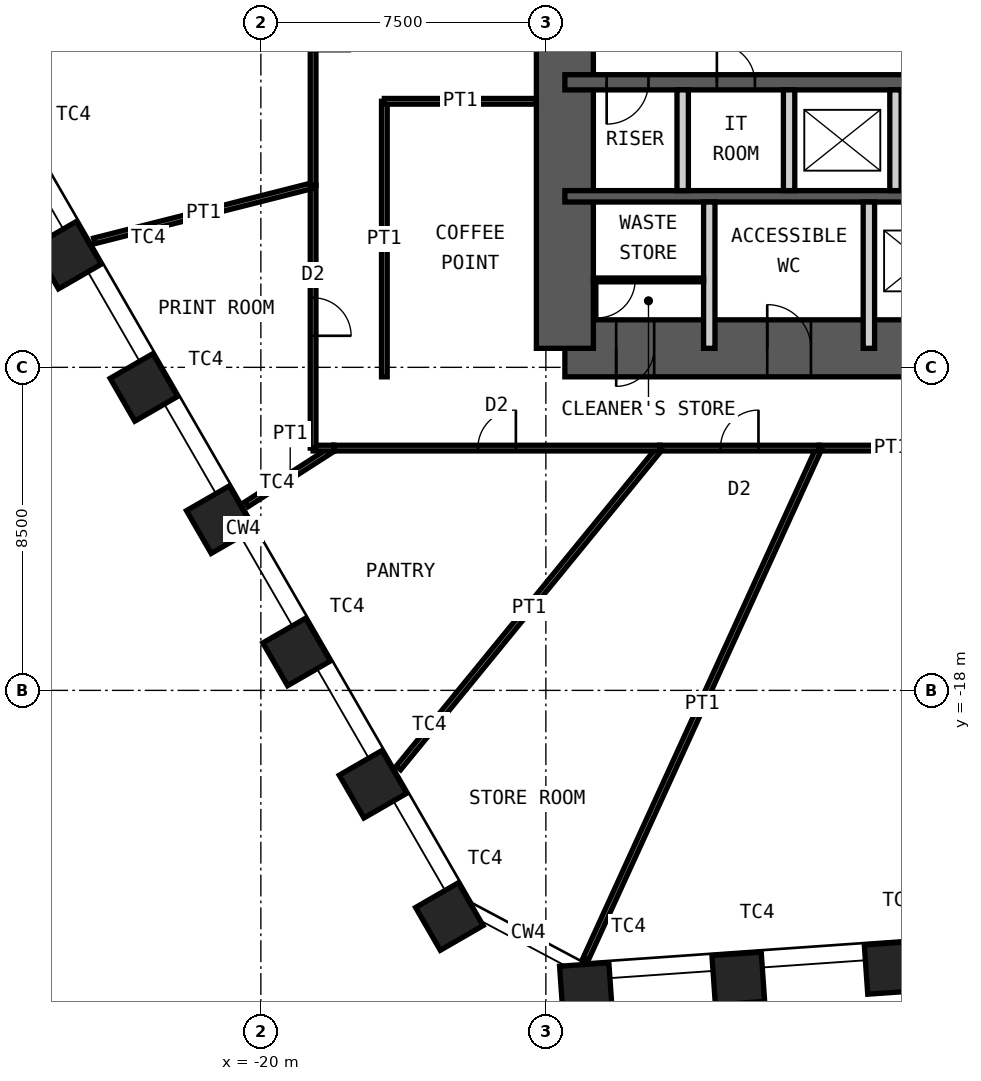
"""IFC4 building model, lengths in metres.
Left out: names, types, materials, properties, quantities, classifications, styles, units other than length and angle.
Written with IfcOpenShell. Run it as: python <this file> out.ifc"""

import sys

from ifc_helpers import new_model, si_unit, direction, frame, frame_2d, origin, origin_2d, place, context, subcontext, project, spatial, rectangle, hollow_rectangle, extrude, element, fill, save


model = new_model("IFC4")
c1 = context("Model", 3, precision=1e-05, world=origin(), true_north=direction((0.0, 1.0)))
c2 = subcontext(c1, "Body", "Model", "MODEL_VIEW")
j1 = project(units=[si_unit("LENGTHUNIT", "METRE"), si_unit("PLANEANGLEUNIT", "RADIAN")], contexts=[c1])
p1 = place(None, origin())
s1 = spatial("IfcSite", under=j1, at=p1, CompositionType="ELEMENT")
p2 = place(p1, origin())
s2 = spatial("IfcBuilding", under=s1, at=p2, CompositionType="ELEMENT")
p3 = place(p2, frame((0.0, 0.0, 149.2)))
s3 = spatial("IfcBuildingStorey", under=s2, at=p3, CompositionType="ELEMENT", Elevation=149.2)
for number, where, z_axis, x_axis in (
    (1, (-3.427, -25.301, 0.0), (0.0, 0.0, 1.0), (0.998, 0.07, 0.0)),
    (2, (-7.436, -25.581, 0.0), (0.0, 0.0, 1.0), (0.998, 0.07, 0.0)),
    (3, (-11.446, -25.861, 0.0), (0.0, 0.0, 1.0), (0.998, 0.07, 0.0)),
    (4, (-15.04, -23.95, 0.0), (0.0, 0.0, 1.0), (0.5, -0.866, 0.0)),
    (5, (-17.049, -20.47, 0.0), (0.0, 0.0, 1.0), (0.5, -0.866, 0.0)),
    (6, (-19.059, -16.989, 0.0), (0.0, 0.0, 1.0), (0.5, -0.866, 0.0)),
    (7, (-21.068, -13.509, 0.0), (0.0, 0.0, 1.0), (0.5, -0.866, 0.0)),
    (8, (-23.078, -10.028, 0.0), (0.0, 0.0, 1.0), (0.5, -0.866, 0.0)),
    (9, (-25.087, -6.547, 0.0), (0.0, 0.0, 1.0), (0.5, -0.866, 0.0)),
):
    element("IfcColumn", number, at=place(p3, frame(where, z_axis=z_axis, x_axis=x_axis)), inside=s3, PredefinedType="COLUMN", context=c2, shape_type="SweptSolid", body=[
        extrude(hollow_rectangle(XDim=1.3, YDim=1.3, WallThickness=0.1, at=origin_2d()), origin(), (0.0, 0.0, 1.0), 4.2),
    ])
p4 = place(p3, frame((-12.0, -9.0, 0.0), z_axis=(0.0, 0.0, 1.0), x_axis=(1.0, 0.0, 0.0)))
e10 = element("IfcWall", 10, at=p4, inside=s3, PredefinedType="SHEAR", context=c2, shape_type="SweptSolid", body=[
    extrude(rectangle(XDim=24.0, YDim=1.5, at=frame_2d((12.0, 0.0))), origin(), (0.0, 0.0, 1.0), 4.2),
])
p5 = place(p4, frame((1.35, 0.0, 0.0)))
e11 = element("IfcOpeningElement", 11, at=p5, cuts=e10, PredefinedType="OPENING", context=c2, shape_type="SweptSolid", body=[
    extrude(rectangle(XDim=1.0, YDim=2.1, at=frame_2d((0.5, 1.05))), frame((0.0, 0.76, 0.0), z_axis=(0.0, -1.0, 0.0), x_axis=(1.0, 0.0, 0.0)), (0.0, 0.0, 1.0), 1.52),
])
p6 = place(p4, frame((5.325, 0.0, 0.0)))
e12 = element("IfcOpeningElement", 12, at=p6, cuts=e10, PredefinedType="OPENING", context=c2, shape_type="SweptSolid", body=[
    extrude(rectangle(XDim=1.15, YDim=2.1, at=frame_2d((0.575, 1.05))), frame((0.0, 0.76, 0.0), z_axis=(0.0, -1.0, 0.0), x_axis=(1.0, 0.0, 0.0)), (0.0, 0.0, 1.0), 1.52),
])
p7 = place(p4, frame((12.6, 0.0, 0.0)))
e13 = element("IfcOpeningElement", 13, at=p7, cuts=e10, PredefinedType="OPENING", context=c2, shape_type="SweptSolid", body=[
    extrude(rectangle(XDim=1.0, YDim=2.1, at=frame_2d((0.5, 1.05))), frame((0.0, 0.76, 0.0), z_axis=(0.0, -1.0, 0.0), x_axis=(1.0, 0.0, 0.0)), (0.0, 0.0, 1.0), 1.52),
])
p8 = place(p3, frame((-12.0, -9.0, 0.0), z_axis=(0.0, 0.0, 1.0), x_axis=(0.0, 1.0, 0.0)))
e14 = element("IfcWall", 14, at=p8, inside=s3, PredefinedType="SHEAR", context=c2, shape_type="SweptSolid", body=[
    extrude(rectangle(XDim=18.0, YDim=1.5, at=frame_2d((9.0, 0.0))), origin(), (0.0, 0.0, 1.0), 4.2),
])
p9 = place(p8, frame((8.1, 0.0, 0.0)))
e15 = element("IfcOpeningElement", 15, at=p9, cuts=e14, PredefinedType="OPENING", context=c2, shape_type="SweptSolid", body=[
    extrude(rectangle(XDim=1.8, YDim=2.1, at=frame_2d((0.9, 1.05))), frame((0.0, 0.76, 0.0), z_axis=(0.0, -1.0, 0.0), x_axis=(1.0, 0.0, 0.0)), (0.0, 0.0, 1.0), 1.52),
])
p10 = place(p3, frame((-12.0, -2.0, 0.0), z_axis=(0.0, 0.0, 1.0), x_axis=(1.0, 0.0, 0.0)))
e16 = element("IfcWall", 16, at=p10, inside=s3, PredefinedType="SHEAR", context=c2, shape_type="SweptSolid", body=[
    extrude(rectangle(XDim=24.0, YDim=0.4, at=frame_2d((12.0, 0.0))), origin(), (0.0, 0.0, 1.0), 4.2),
])
p11 = place(p10, frame((1.1, 0.0, 0.0)))
e17 = element("IfcOpeningElement", 17, at=p11, cuts=e16, PredefinedType="OPENING", context=c2, shape_type="SweptSolid", body=[
    extrude(rectangle(XDim=1.1, YDim=2.1, at=frame_2d((0.55, 1.05))), frame((0.0, 0.21, 0.0), z_axis=(0.0, -1.0, 0.0), x_axis=(1.0, 0.0, 0.0)), (0.0, 0.0, 1.0), 0.42),
])
p12 = place(p10, frame((13.55, 0.0, 0.0)))
e18 = element("IfcOpeningElement", 18, at=p12, cuts=e16, PredefinedType="OPENING", context=c2, shape_type="SweptSolid", body=[
    extrude(rectangle(XDim=1.1, YDim=2.1, at=frame_2d((0.55, 1.05))), frame((0.0, 0.21, 0.0), z_axis=(0.0, -1.0, 0.0), x_axis=(1.0, 0.0, 0.0)), (0.0, 0.0, 1.0), 0.42),
])
p13 = place(p10, frame((20.7, 0.0, 0.0)))
e19 = element("IfcOpeningElement", 19, at=p13, cuts=e16, PredefinedType="OPENING", context=c2, shape_type="SweptSolid", body=[
    extrude(rectangle(XDim=1.1, YDim=2.1, at=frame_2d((0.55, 1.05))), frame((0.0, 0.21, 0.0), z_axis=(0.0, -1.0, 0.0), x_axis=(1.0, 0.0, 0.0)), (0.0, 0.0, 1.0), 0.42),
])
p14 = place(p10, frame((4.0, 0.0, 0.0)))
e20 = element("IfcOpeningElement", 20, at=p14, cuts=e16, PredefinedType="OPENING", context=c2, shape_type="SweptSolid", body=[
    extrude(rectangle(XDim=1.0, YDim=2.1, at=frame_2d((0.5, 1.05))), frame((0.0, 0.21, 0.0), z_axis=(0.0, -1.0, 0.0), x_axis=(1.0, 0.0, 0.0)), (0.0, 0.0, 1.0), 0.42),
])
p15 = place(p3, frame((-12.0, -5.0, 0.0), z_axis=(0.0, 0.0, 1.0), x_axis=(1.0, 0.0, 0.0)))
e21 = element("IfcWall", 21, at=p15, inside=s3, PredefinedType="SHEAR", context=c2, shape_type="SweptSolid", body=[
    extrude(rectangle(XDim=24.0, YDim=0.3, at=frame_2d((12.0, 0.0))), origin(), (0.0, 0.0, 1.0), 4.2),
])
for number, where, z_axis, x_axis in (
    (22, (-8.9, -4.85, 0.0), (0.0, 0.0, 1.0), (0.0, 1.0, 0.0)),
    (23, (-6.1, -4.85, 0.0), (0.0, 0.0, 1.0), (0.0, 1.0, 0.0)),
    (24, (-3.3, -4.85, 0.0), (0.0, 0.0, 1.0), (0.0, 1.0, 0.0)),
):
    element("IfcWall", number, at=place(p3, frame(where, z_axis=z_axis, x_axis=x_axis)), inside=s3, PredefinedType="PARTITIONING", context=c2, shape_type="SweptSolid", body=[
        extrude(rectangle(XDim=2.65, YDim=0.3, at=frame_2d((1.325, 0.0))), origin(), (0.0, 0.0, 1.0), 3.98),
    ])
for number, where, z_axis, x_axis in (
    (25, (-8.2, -9.0, 0.0), (0.0, 0.0, 1.0), (0.0, 1.0, 0.0)),
    (26, (-4.0, -9.0, 0.0), (0.0, 0.0, 1.0), (0.0, 1.0, 0.0)),
):
    element("IfcWall", number, at=place(p3, frame(where, z_axis=z_axis, x_axis=x_axis)), inside=s3, PredefinedType="PARTITIONING", context=c2, shape_type="SweptSolid", body=[
        extrude(rectangle(XDim=3.85, YDim=0.3, at=frame_2d((1.925, 0.0))), origin(), (0.0, 0.0, 1.0), 3.98),
    ])
p16 = place(p3, frame((-11.25, -7.2, 0.0), z_axis=(0.0, 0.0, 1.0), x_axis=(1.0, 0.0, 0.0)))
e27 = element("IfcWall", 27, at=p16, inside=s3, PredefinedType="PARTITIONING", context=c2, shape_type="SweptSolid", body=[
    extrude(rectangle(XDim=2.9, YDim=0.1, at=frame_2d((1.45, 0.0))), origin(), (0.0, 0.0, 1.0), 3.98),
])
p17 = place(p16, frame((0.1, 0.0, 0.0)))
e28 = element("IfcOpeningElement", 28, at=p17, cuts=e27, PredefinedType="OPENING", context=c2, shape_type="SweptSolid", body=[
    extrude(rectangle(XDim=1.0, YDim=2.4, at=frame_2d((0.5, 1.2))), frame((0.0, 0.06, 0.0), z_axis=(0.0, -1.0, 0.0), x_axis=(1.0, 0.0, 0.0)), (0.0, 0.0, 1.0), 0.12),
])
p18 = place(p3, frame((4.184, -11.625, 0.0), z_axis=(0.0, 0.0, 1.0), x_axis=(-1.0, 0.0, 0.0)))
e29 = element("IfcWall", 29, at=p18, inside=s3, PredefinedType="PARTITIONING", context=c2, shape_type="SweptSolid", body=[
    extrude(rectangle(XDim=9.494, YDim=0.15, at=frame_2d((4.747, 0.0))), origin(), (0.0, 0.0, 1.0), 4.03),
])
p19 = place(p18, frame((3.847, 0.0, 0.0)))
e30 = element("IfcOpeningElement", 30, at=p19, cuts=e29, PredefinedType="OPENING", context=c2, shape_type="SweptSolid", body=[
    extrude(rectangle(XDim=1.8, YDim=2.4, at=frame_2d((0.9, 1.2))), frame((0.0, 0.085, 0.0), z_axis=(0.0, -1.0, 0.0), x_axis=(1.0, 0.0, 0.0)), (0.0, 0.0, 1.0), 0.17),
])
p20 = place(p3, frame((-11.453, -25.072, 0.0), z_axis=(0.0, 0.0, 1.0), x_axis=(0.415494357555, 0.909595755729, 0.0)))
e31 = element("IfcWall", 31, at=p20, inside=s3, PredefinedType="PARTITIONING", context=c2, shape_type="SweptSolid", body=[
    extrude(rectangle(XDim=14.784, YDim=0.15, at=frame_2d((7.392, 0.0))), origin(), (0.0, 0.0, 1.0), 2.93),
])
p21 = place(p3, frame((-5.31, -11.625, 0.0), z_axis=(0.0, 0.0, 1.0), x_axis=(-1.0, 0.0, 0.0)))
e32 = element("IfcWall", 32, at=p21, inside=s3, PredefinedType="PARTITIONING", context=c2, shape_type="SweptSolid", body=[
    extrude(rectangle(XDim=4.19, YDim=0.15, at=frame_2d((2.095, 0.0))), origin(), (0.0, 0.0, 1.0), 4.03),
])
p22 = place(p21, frame((1.595, 0.0, 0.0)))
e33 = element("IfcOpeningElement", 33, at=p22, cuts=e32, PredefinedType="OPENING", context=c2, shape_type="SweptSolid", body=[
    extrude(rectangle(XDim=1.0, YDim=2.4, at=frame_2d((0.5, 1.2))), frame((0.0, 0.085, 0.0), z_axis=(0.0, -1.0, 0.0), x_axis=(1.0, 0.0, 0.0)), (0.0, 0.0, 1.0), 0.17),
])
p23 = place(p3, frame((-16.38, -20.042, 0.0), z_axis=(0.0, 0.0, 1.0), x_axis=(0.632814540967, 0.774303400962, 0.0)))
e34 = element("IfcWall", 34, at=p23, inside=s3, PredefinedType="PARTITIONING", context=c2, shape_type="SweptSolid", body=[
    extrude(rectangle(XDim=10.871, YDim=0.15, at=frame_2d((5.435, 0.0))), origin(), (0.0, 0.0, 1.0), 3.33),
])
p24 = place(p3, frame((-9.501, -11.625, 0.0), z_axis=(0.0, 0.0, 1.0), x_axis=(-1.0, 0.0, 0.0)))
e35 = element("IfcWall", 35, at=p24, inside=s3, PredefinedType="PARTITIONING", context=c2, shape_type="SweptSolid", body=[
    extrude(rectangle(XDim=8.577, YDim=0.15, at=frame_2d((4.288, 0.0))), origin(), (0.0, 0.0, 1.0), 4.03),
])
p25 = place(p24, frame((3.788, 0.0, 0.0)))
e36 = element("IfcOpeningElement", 36, at=p25, cuts=e35, PredefinedType="OPENING", context=c2, shape_type="SweptSolid", body=[
    extrude(rectangle(XDim=1.0, YDim=2.4, at=frame_2d((0.5, 1.2))), frame((0.0, 0.085, 0.0), z_axis=(0.0, -1.0, 0.0), x_axis=(1.0, 0.0, 0.0)), (0.0, 0.0, 1.0), 0.17),
])
p26 = place(p3, frame((-20.378, -13.104, 0.0), z_axis=(0.0, 0.0, 1.0), x_axis=(0.841108871346, 0.540865848934, 0.0)))
e37 = element("IfcWall", 37, at=p26, inside=s3, PredefinedType="PARTITIONING", context=c2, shape_type="SweptSolid", body=[
    extrude(rectangle(XDim=2.735, YDim=0.15, at=frame_2d((1.368, 0.0))), origin(), (0.0, 0.0, 1.0), 3.33),
])
p27 = place(p3, frame((-18.077, -11.625, 0.0), z_axis=(0.0, 0.0, 1.0), x_axis=(-1.0, 0.0, 0.0)))
e38 = element("IfcWall", 38, at=p27, inside=s3, PredefinedType="PARTITIONING", context=c2, shape_type="SweptSolid", body=[
    extrude(rectangle(XDim=0.548, YDim=0.15, at=frame_2d((0.274, 0.0))), origin(), (0.0, 0.0, 1.0), 4.03),
])
p28 = place(p3, frame((-18.625, -11.625, 0.0), z_axis=(0.0, 0.0, 1.0), x_axis=(0.0, 1.0, 0.0)))
e39 = element("IfcWall", 39, at=p28, inside=s3, PredefinedType="PARTITIONING", context=c2, shape_type="SweptSolid", body=[
    extrude(rectangle(XDim=6.91, YDim=0.15, at=frame_2d((3.455, 0.0))), origin(), (0.0, 0.0, 1.0), 4.03),
])
p29 = place(p28, frame((2.955, 0.0, 0.0)))
e40 = element("IfcOpeningElement", 40, at=p29, cuts=e39, PredefinedType="OPENING", context=c2, shape_type="SweptSolid", body=[
    extrude(rectangle(XDim=1.0, YDim=2.4, at=frame_2d((0.5, 1.2))), frame((0.0, 0.085, 0.0), z_axis=(0.0, -1.0, 0.0), x_axis=(1.0, 0.0, 0.0)), (0.0, 0.0, 1.0), 0.17),
])
p30 = place(p3, frame((-24.384, -6.173, 0.0), z_axis=(0.0, 0.0, 1.0), x_axis=(0.969427635767, 0.245377380804, 0.0)))
e41 = element("IfcWall", 41, at=p30, inside=s3, PredefinedType="PARTITIONING", context=c2, shape_type="SweptSolid", body=[
    extrude(rectangle(XDim=5.941, YDim=0.15, at=frame_2d((2.97, 0.0))), origin(), (0.0, 0.0, 1.0), 3.33),
])
p31 = place(p3, frame((-18.625, -4.715, 0.0), z_axis=(0.0, 0.0, 1.0), x_axis=(0.0, 1.0, 0.0)))
e42 = element("IfcWall", 42, at=p31, inside=s3, PredefinedType="PARTITIONING", context=c2, shape_type="SweptSolid", body=[
    extrude(rectangle(XDim=8.068, YDim=0.15, at=frame_2d((4.034, 0.0))), origin(), (0.0, 0.0, 1.0), 4.03),
])
p32 = place(p31, frame((3.534, 0.0, 0.0)))
e43 = element("IfcOpeningElement", 43, at=p32, cuts=e42, PredefinedType="OPENING", context=c2, shape_type="SweptSolid", body=[
    extrude(rectangle(XDim=1.0, YDim=2.4, at=frame_2d((0.5, 1.2))), frame((0.0, 0.085, 0.0), z_axis=(0.0, -1.0, 0.0), x_axis=(1.0, 0.0, 0.0)), (0.0, 0.0, 1.0), 0.17),
])
p33 = place(p3, frame((-16.75, -9.75, 0.0), z_axis=(0.0, 0.0, 1.0), x_axis=(0.0, 1.0, 0.0)))
e44 = element("IfcWall", 44, at=p33, inside=s3, PredefinedType="PARTITIONING", context=c2, shape_type="SweptSolid", body=[
    extrude(rectangle(XDim=7.25, YDim=0.15, at=frame_2d((3.625, 0.0))), origin(), (0.0, 0.0, 1.0), 4.03),
])
p34 = place(p3, frame((-12.75, -2.5, 0.0), z_axis=(0.0, 0.0, 1.0), x_axis=(-1.0, 0.0, 0.0)))
e45 = element("IfcWall", 45, at=p34, inside=s3, PredefinedType="PARTITIONING", context=c2, shape_type="SweptSolid", body=[
    extrude(rectangle(XDim=4.0, YDim=0.15, at=frame_2d((2.0, 0.0))), origin(), (0.0, 0.0, 1.0), 3.33),
])
p35 = place(p5, origin())
e46 = element("IfcDoor", 46, at=p35, inside=s3, OperationType="SINGLE_SWING_LEFT", PredefinedType="DOOR", context=c2, shape_type="SweptSolid", body=[
    extrude(rectangle(XDim=1.0, YDim=2.1, at=frame_2d((0.5, 1.05))), frame((0.0, 0.025, 0.0), z_axis=(0.0, -1.0, 0.0), x_axis=(1.0, 0.0, 0.0)), (0.0, 0.0, 1.0), 0.05),
])
fill(e11, e46)
p36 = place(p6, origin())
e47 = element("IfcDoor", 47, at=p36, inside=s3, OperationType="SINGLE_SWING_RIGHT", PredefinedType="DOOR", context=c2, shape_type="SweptSolid", body=[
    extrude(rectangle(XDim=1.15, YDim=2.1, at=frame_2d((0.575, 1.05))), frame((0.0, 0.025, 0.0), z_axis=(0.0, -1.0, 0.0), x_axis=(1.0, 0.0, 0.0)), (0.0, 0.0, 1.0), 0.05),
])
fill(e12, e47)
p37 = place(p11, origin())
e48 = element("IfcDoor", 48, at=p37, inside=s3, OperationType="SINGLE_SWING_LEFT", PredefinedType="DOOR", context=c2, shape_type="SweptSolid", body=[
    extrude(rectangle(XDim=1.1, YDim=2.1, at=frame_2d((0.55, 1.05))), frame((0.0, 0.025, 0.0), z_axis=(0.0, -1.0, 0.0), x_axis=(1.0, 0.0, 0.0)), (0.0, 0.0, 1.0), 0.05),
])
fill(e17, e48)
p38 = place(p14, origin())
e49 = element("IfcDoor", 49, at=p38, inside=s3, OperationType="SINGLE_SWING_RIGHT", PredefinedType="DOOR", context=c2, shape_type="SweptSolid", body=[
    extrude(rectangle(XDim=1.0, YDim=2.1, at=frame_2d((0.5, 1.05))), frame((0.0, 0.025, 0.0), z_axis=(0.0, -1.0, 0.0), x_axis=(1.0, 0.0, 0.0)), (0.0, 0.0, 1.0), 0.05),
])
fill(e20, e49)
p39 = place(p17, origin())
e50 = element("IfcDoor", 50, at=p39, inside=s3, OperationType="SINGLE_SWING_LEFT", PredefinedType="DOOR", context=c2, shape_type="SweptSolid", body=[
    extrude(rectangle(XDim=1.0, YDim=2.4, at=frame_2d((0.5, 1.2))), frame((0.0, 0.025, 0.0), z_axis=(0.0, -1.0, 0.0), x_axis=(1.0, 0.0, 0.0)), (0.0, 0.0, 1.0), 0.05),
])
fill(e28, e50)
p40 = place(p22, origin())
e51 = element("IfcDoor", 51, at=p40, inside=s3, OperationType="SINGLE_SWING_LEFT", PredefinedType="DOOR", context=c2, shape_type="SweptSolid", body=[
    extrude(rectangle(XDim=1.0, YDim=2.4, at=frame_2d((0.5, 1.2))), frame((0.0, 0.025, 0.0), z_axis=(0.0, -1.0, 0.0), x_axis=(1.0, 0.0, 0.0)), (0.0, 0.0, 1.0), 0.05),
])
fill(e33, e51)
p41 = place(p25, origin())
e52 = element("IfcDoor", 52, at=p41, inside=s3, OperationType="SINGLE_SWING_LEFT", PredefinedType="DOOR", context=c2, shape_type="SweptSolid", body=[
    extrude(rectangle(XDim=1.0, YDim=2.4, at=frame_2d((0.5, 1.2))), frame((0.0, 0.025, 0.0), z_axis=(0.0, -1.0, 0.0), x_axis=(1.0, 0.0, 0.0)), (0.0, 0.0, 1.0), 0.05),
])
fill(e36, e52)
p42 = place(p29, origin())
e53 = element("IfcDoor", 53, at=p42, inside=s3, OperationType="SINGLE_SWING_LEFT", PredefinedType="DOOR", context=c2, shape_type="SweptSolid", body=[
    extrude(rectangle(XDim=1.0, YDim=2.4, at=frame_2d((0.5, 1.2))), frame((0.0, 0.025, 0.0), z_axis=(0.0, -1.0, 0.0), x_axis=(1.0, 0.0, 0.0)), (0.0, 0.0, 1.0), 0.05),
])
fill(e40, e53)
save(model, sys.argv[1])
